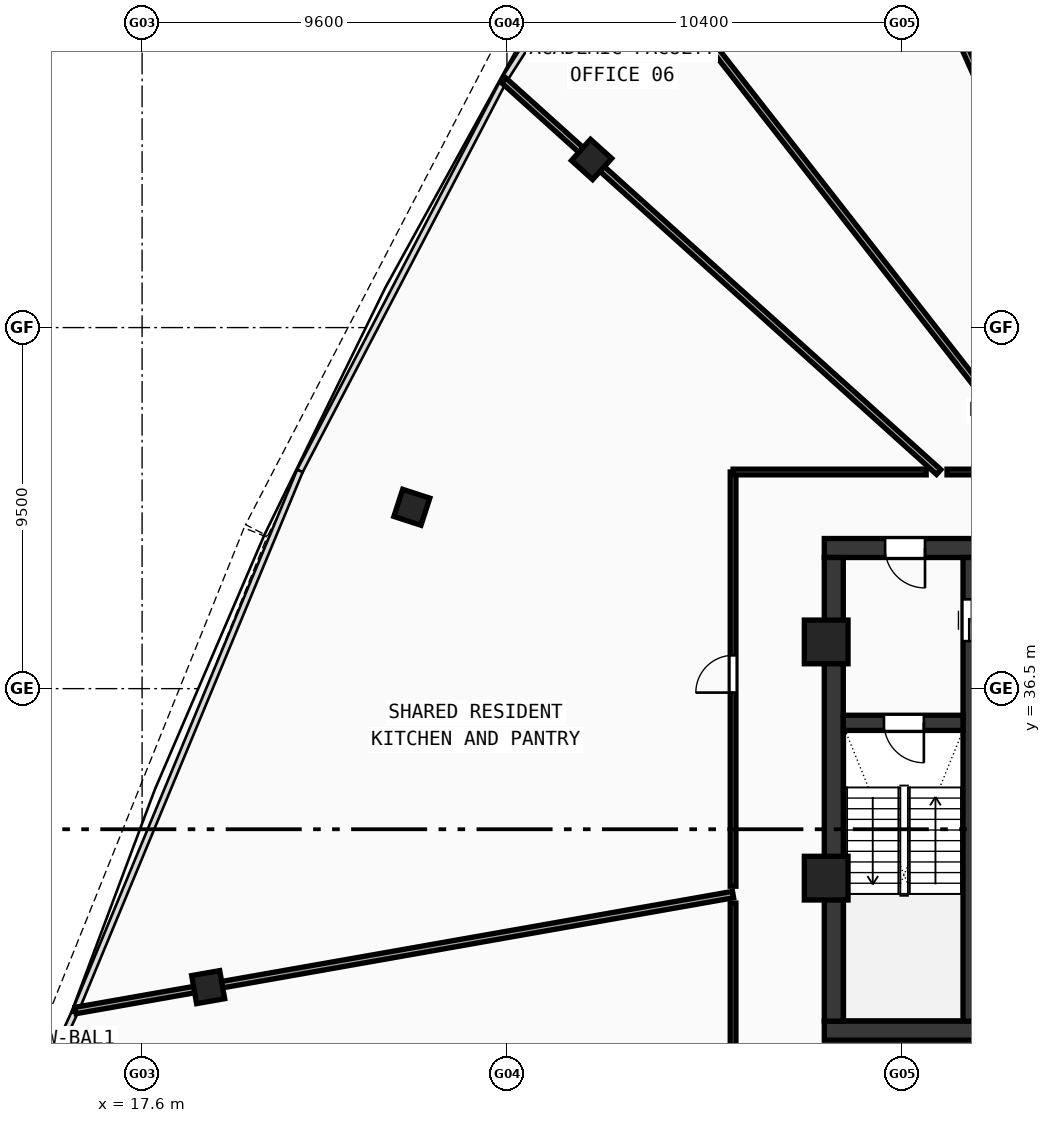
"""IFC4 building model, lengths in metres.
Left out: names, types, materials, properties, quantities, classifications, styles, units other than length and angle.
Written with IfcOpenShell. Run it as: python <this file> out.ifc"""

import sys

from ifc_helpers import new_model, si_unit, direction, frame, frame_2d, origin, origin_with_axes, origin_2d, place, context, subcontext, project, spatial, rectangle, hollow_rectangle, extrude, source, transform, mapped, element, fill, save


model = new_model("IFC4")
c1 = context("Model", 3, precision=1e-05, world=origin(), true_north=direction((0.0, 1.0)))
c2 = subcontext(c1, "Body", "Model", "MODEL_VIEW")
j1 = project(units=[si_unit("LENGTHUNIT", "METRE"), si_unit("PLANEANGLEUNIT", "RADIAN")], contexts=[c1])
p1 = place(None, origin())
s1 = spatial("IfcSite", under=j1, at=p1, CompositionType="ELEMENT")
p2 = place(p1, origin())
s2 = spatial("IfcBuilding", under=s1, at=p2, CompositionType="ELEMENT")
p3 = place(p2, frame((0.0, 0.0, 285.02)))
s3 = spatial("IfcBuildingStorey", under=s2, at=p3, CompositionType="ELEMENT", Elevation=285.02)
p4 = place(p3, frame((35.55, 27.5, 0.0), z_axis=(0.0, 0.0, 1.0), x_axis=(1.0, 0.0, 0.0)))
e1 = element("IfcWall", 1, at=p4, inside=s3, PredefinedType="SHEAR", context=c2, shape_type="SweptSolid", body=[
    extrude(rectangle(XDim=24.9, YDim=0.5, at=frame_2d((12.45, 0.0))), origin(), (0.0, 0.0, 1.0), 3.47),
])
p5 = place(p3, frame((35.55, 40.2, 0.0), z_axis=(0.0, 0.0, 1.0), x_axis=(1.0, 0.0, 0.0)))
e2 = element("IfcWall", 2, at=p5, inside=s3, PredefinedType="SHEAR", context=c2, shape_type="SweptSolid", body=[
    extrude(rectangle(XDim=11.25, YDim=0.5, at=frame_2d((5.625, 0.0))), origin(), (0.0, 0.0, 1.0), 3.47),
])
p6 = place(p5, frame((1.6, 0.0, 0.0)))
e3 = element("IfcOpeningElement", 3, at=p6, cuts=e2, PredefinedType="OPENING", context=c2, shape_type="SweptSolid", body=[
    extrude(rectangle(XDim=1.05, YDim=2.1, at=frame_2d((0.525, 1.05))), frame((0.0, 0.26, 0.0), z_axis=(0.0, -1.0, 0.0), x_axis=(1.0, 0.0, 0.0)), (0.0, 0.0, 1.0), 0.52),
])
p7 = place(p3, frame((35.8, 27.75, 0.0), z_axis=(0.0, 0.0, 1.0), x_axis=(0.0, 1.0, 0.0)))
e4 = element("IfcWall", 4, at=p7, inside=s3, PredefinedType="SHEAR", context=c2, shape_type="SweptSolid", body=[
    extrude(rectangle(XDim=12.2, YDim=0.5, at=frame_2d((6.1, 0.0))), origin(), (0.0, 0.0, 1.0), 3.47),
])
p8 = place(p3, frame((39.4, 27.75, 0.0), z_axis=(0.0, 0.0, 1.0), x_axis=(0.0, 1.0, 0.0)))
e5 = element("IfcWall", 5, at=p8, inside=s3, PredefinedType="SHEAR", context=c2, shape_type="SweptSolid", body=[
    extrude(rectangle(XDim=12.2, YDim=0.4, at=frame_2d((6.1, 0.0))), origin(), (0.0, 0.0, 1.0), 3.47),
])
p9 = place(p8, frame((10.0, 0.0, 0.0)))
e6 = element("IfcOpeningElement", 6, at=p9, cuts=e5, PredefinedType="OPENING", context=c2, shape_type="SweptSolid", body=[
    extrude(rectangle(XDim=1.1, YDim=2.1, at=frame_2d((0.55, 1.05))), frame((0.0, 0.21, 0.0), z_axis=(0.0, -1.0, 0.0), x_axis=(1.0, 0.0, 0.0)), (0.0, 0.0, 1.0), 0.42),
])
p10 = place(p3, frame((36.05, 35.6, 0.0), z_axis=(0.0, 0.0, 1.0), x_axis=(1.0, 0.0, 0.0)))
e7 = element("IfcWall", 7, at=p10, inside=s3, PredefinedType="SHEAR", context=c2, shape_type="SweptSolid", body=[
    extrude(rectangle(XDim=3.15, YDim=0.4, at=frame_2d((1.575, 0.0))), origin(), (0.0, 0.0, 1.0), 3.47),
])
p11 = place(p10, frame((1.07, 0.0, 0.0)))
e8 = element("IfcOpeningElement", 8, at=p11, cuts=e7, PredefinedType="OPENING", context=c2, shape_type="SweptSolid", body=[
    extrude(rectangle(XDim=1.05, YDim=2.1, at=frame_2d((0.525, 1.05))), frame((0.0, 0.21, 0.0), z_axis=(0.0, -1.0, 0.0), x_axis=(1.0, 0.0, 0.0)), (0.0, 0.0, 1.0), 0.42),
])
m1 = source(origin(), c2, "Body", "SweptSolid", [
    extrude(hollow_rectangle(XDim=1.15, YDim=1.15, WallThickness=0.048, at=origin_2d()), origin(), (0.0, 0.0, 1.0), 3.73),
])
for number, where, z_axis, x_axis in (
    (9, (35.6, 37.729, -0.26), (0.0, 0.0, 1.0), (1.0, 0.0, 0.0)),
    (10, (35.6, 31.513, -0.26), (0.0, 0.0, 1.0), (1.0, 0.0, 0.0)),
):
    element("IfcColumn", number, at=place(p3, frame(where, z_axis=z_axis, x_axis=x_axis)), inside=s3, PredefinedType="COLUMN", context=c2, shape_type="MappedRepresentation", body=[
        mapped(m1, transform((0.0, 0.0, 0.0), scale=1.0)),
    ])
m2 = source(origin(), c2, "Body", "SweptSolid", [
    extrude(hollow_rectangle(XDim=0.75, YDim=0.75, WallThickness=0.028, at=origin_2d()), origin(), (0.0, 0.0, 1.0), 3.73),
])
for number, where, z_axis, x_axis in (
    (11, (29.427, 50.424, -0.26), (0.0, 0.0, 1.0), (-0.669, -0.743, 0.0)),
    (12, (24.698, 41.271, -0.26), (0.0, 0.0, 1.0), (-0.309, -0.951, 0.0)),
    (13, (19.338, 28.646, -0.26), (0.0, 0.0, 1.0), (0.174, -0.985, 0.0)),
):
    element("IfcColumn", number, at=place(p3, frame(where, z_axis=z_axis, x_axis=x_axis)), inside=s3, PredefinedType="COLUMN", context=c2, shape_type="MappedRepresentation", body=[
        mapped(m2, transform((0.0, 0.0, 0.0), scale=1.0)),
    ])
p12 = place(p3, frame((15.402, 27.174, 0.0), z_axis=(0.0, 0.0, 1.0), x_axis=(0.497929527106, -0.867217496385, 0.0)))
e14 = element("IfcWall", 14, at=p12, inside=s3, PredefinedType="STANDARD", context=c2, shape_type="SweptSolid", body=[
    extrude(rectangle(XDim=7.293, YDim=0.26, at=frame_2d((3.647, 0.0))), origin(), (0.0, 0.0, 1.0), 3.47),
])
p13 = place(p12, frame((2.747, 0.0, 0.0)))
e15 = element("IfcOpeningElement", 15, at=p13, cuts=e14, PredefinedType="OPENING", context=c2, shape_type="SweptSolid", body=[
    extrude(rectangle(XDim=1.8, YDim=2.15, at=frame_2d((0.9, 1.075))), frame((0.0, 0.14, 0.0), z_axis=(0.0, -1.0, 0.0), x_axis=(1.0, 0.0, 0.0)), (0.0, 0.0, 1.0), 0.28),
])
p14 = place(p3, frame((42.702, 45.6, 0.0), z_axis=(0.0, 0.0, 1.0), x_axis=(-0.406743072482, 0.91354259506, 0.0)))
e16 = element("IfcWall", 16, at=p14, inside=s3, PredefinedType="PARTITIONING", context=c2, shape_type="SweptSolid", body=[
    extrude(rectangle(XDim=20.191, YDim=0.17, at=frame_2d((10.096, 0.0))), origin(), (0.0, 0.0, 1.0), 2.87),
])
p15 = place(p3, frame((41.359, 42.2, 0.0), z_axis=(0.0, 0.0, 1.0), x_axis=(-0.615658553978, 0.788013036005, 0.0)))
e17 = element("IfcWall", 17, at=p15, inside=s3, PredefinedType="PARTITIONING", context=c2, shape_type="SweptSolid", body=[
    extrude(rectangle(XDim=18.609, YDim=0.17, at=frame_2d((9.304, 0.0))), origin(), (0.0, 0.0, 1.0), 2.87),
])
p16 = place(p3, frame((38.56, 42.2, 0.0), z_axis=(0.0, 0.0, 1.0), x_axis=(-0.743145118403, 0.669130281032, 0.0)))
e18 = element("IfcWall", 18, at=p16, inside=s3, PredefinedType="PARTITIONING", context=c2, shape_type="SweptSolid", body=[
    extrude(rectangle(XDim=15.397, YDim=0.17, at=frame_2d((7.699, 0.0))), origin(), (0.0, 0.0, 1.0), 2.87),
])
p17 = place(p3, frame((33.15, 31.082, 0.0), z_axis=(0.0, 0.0, 1.0), x_axis=(-0.984807054696, -0.173652137966, 0.0)))
e19 = element("IfcWall", 19, at=p17, inside=s3, PredefinedType="PARTITIONING", context=c2, shape_type="SweptSolid", body=[
    extrude(rectangle(XDim=17.567, YDim=0.17, at=frame_2d((8.783, 0.0))), origin(), (0.0, 0.0, 1.0), 2.87),
])
p18 = place(p3, frame((33.15, 24.9, 0.0), z_axis=(0.0, 0.0, 1.0), x_axis=(0.0, 1.0, 0.0)))
e20 = element("IfcWall", 20, at=p18, inside=s3, PredefinedType="PARTITIONING", context=c2, shape_type="SweptSolid", body=[
    extrude(rectangle(XDim=5.958, YDim=0.15, at=frame_2d((2.979, 0.0))), origin(), (0.0, 0.0, 1.0), 3.12),
])
p19 = place(p3, frame((33.15, 31.301, 0.0), z_axis=(0.0, 0.0, 1.0), x_axis=(0.0, 1.0, 0.0)))
e21 = element("IfcWall", 21, at=p19, inside=s3, PredefinedType="PARTITIONING", context=c2, shape_type="SweptSolid", body=[
    extrude(rectangle(XDim=10.899, YDim=0.15, at=frame_2d((5.449, 0.0))), origin(), (0.0, 0.0, 1.0), 2.87),
])
p20 = place(p19, frame((5.094, 0.0, 0.0)))
e22 = element("IfcOpeningElement", 22, at=p20, cuts=e21, PredefinedType="OPENING", context=c2, shape_type="SweptSolid", body=[
    extrude(rectangle(XDim=0.98, YDim=2.12, at=frame_2d((0.49, 1.06))), frame((0.0, 0.085, 0.0), z_axis=(0.0, -1.0, 0.0), x_axis=(1.0, 0.0, 0.0)), (0.0, 0.0, 1.0), 0.17),
])
p21 = place(p3, frame((33.15, 42.2, 0.0), z_axis=(0.0, 0.0, 1.0), x_axis=(1.0, 0.0, 0.0)))
e23 = element("IfcWall", 23, at=p21, inside=s3, PredefinedType="PARTITIONING", context=c2, shape_type="SweptSolid", body=[
    extrude(rectangle(XDim=5.081, YDim=0.15, at=frame_2d((2.541, 0.0))), origin(), (0.0, 0.0, 1.0), 3.12),
])
p22 = place(p3, frame((38.78, 42.2, 0.0), z_axis=(0.0, 0.0, 1.0), x_axis=(1.0, 0.0, 0.0)))
e24 = element("IfcWall", 24, at=p22, inside=s3, PredefinedType="PARTITIONING", context=c2, shape_type="SweptSolid", body=[
    extrude(rectangle(XDim=2.3, YDim=0.15, at=frame_2d((1.15, 0.0))), origin(), (0.0, 0.0, 1.0), 2.87),
])
p23 = place(p22, frame((0.705, 0.0, 0.0)))
e25 = element("IfcOpeningElement", 25, at=p23, cuts=e24, PredefinedType="OPENING", context=c2, shape_type="SweptSolid", body=[
    extrude(rectangle(XDim=0.98, YDim=2.12, at=frame_2d((0.49, 1.06))), frame((0.0, 0.085, 0.0), z_axis=(0.0, -1.0, 0.0), x_axis=(1.0, 0.0, 0.0)), (0.0, 0.0, 1.0), 0.17),
])
m3 = source(origin(), c2, "Body", "SweptSolid", [
    extrude(rectangle(XDim=1.05, YDim=2.1, at=frame_2d((0.525, 1.05))), frame((0.0, 0.025, 0.0), z_axis=(0.0, -1.0, 0.0), x_axis=(1.0, 0.0, 0.0)), (0.0, 0.0, 1.0), 0.05),
])
p24 = place(p11, frame((1.05, 0.0, 0.0), z_axis=(0.0, 0.0, 1.0), x_axis=(-1.0, 0.0, 0.0)))
e26 = element("IfcDoor", 26, at=p24, inside=s3, OperationType="SINGLE_SWING_LEFT", PredefinedType="DOOR", context=c2, shape_type="MappedRepresentation", body=[
    mapped(m3, transform((0.0, 0.0, 0.0), scale=1.0)),
])
fill(e8, e26)
p25 = place(p6, frame((1.05, 0.0, 0.0), z_axis=(0.0, 0.0, 1.0), x_axis=(-1.0, 0.0, 0.0)))
e27 = element("IfcDoor", 27, at=p25, inside=s3, OperationType="SINGLE_SWING_LEFT", PredefinedType="DOOR", context=c2, shape_type="MappedRepresentation", body=[
    mapped(m3, transform((0.0, 0.0, 0.0), scale=1.0)),
])
fill(e3, e27)
m4 = source(origin(), c2, "Body", "SweptSolid", [
    extrude(rectangle(XDim=1.1, YDim=2.1, at=frame_2d((0.55, 1.05))), frame((0.0, 0.025, 0.0), z_axis=(0.0, -1.0, 0.0), x_axis=(1.0, 0.0, 0.0)), (0.0, 0.0, 1.0), 0.05),
])
p26 = place(p9, frame((1.1, 0.0, 0.0), z_axis=(0.0, 0.0, 1.0), x_axis=(-1.0, 0.0, 0.0)))
e28 = element("IfcDoor", 28, at=p26, inside=s3, OperationType="DOUBLE_DOOR_SLIDING", PredefinedType="DOOR", context=c2, shape_type="MappedRepresentation", body=[
    mapped(m4, transform((0.0, 0.0, 0.0), scale=1.0)),
])
fill(e6, e28)
m5 = source(origin(), c2, "Body", "SweptSolid", [
    extrude(rectangle(XDim=0.98, YDim=2.12, at=frame_2d((0.49, 1.06))), frame((0.0, 0.025, 0.0), z_axis=(0.0, -1.0, 0.0), x_axis=(1.0, 0.0, 0.0)), (0.0, 0.0, 1.0), 0.05),
])
p27 = place(p20, origin_with_axes())
e29 = element("IfcDoor", 29, at=p27, inside=s3, OperationType="SINGLE_SWING_LEFT", PredefinedType="DOOR", context=c2, shape_type="MappedRepresentation", body=[
    mapped(m5, transform((0.0, 0.0, 0.0), scale=1.0)),
])
fill(e22, e29)
save(model, sys.argv[1])
